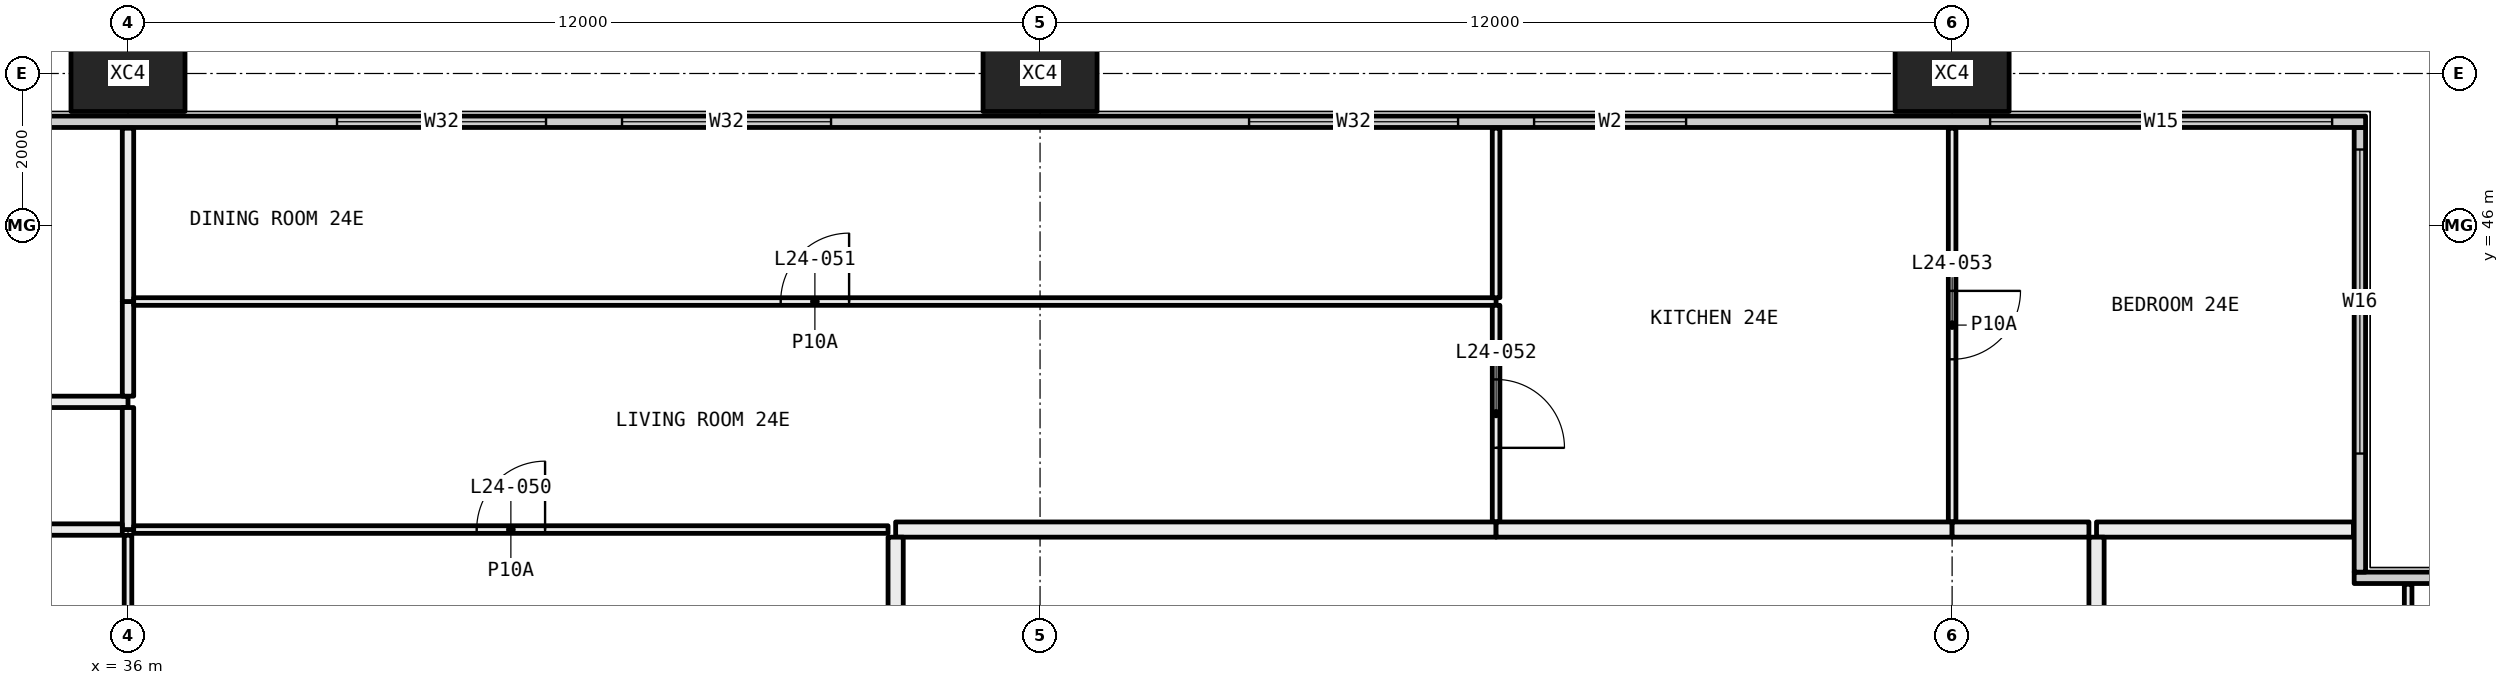
"""IFC4 building model, lengths in metres.
Left out: names, types, materials, properties, quantities, classifications, styles, units other than length and angle.
Written with IfcOpenShell. Run it as: python <this file> out.ifc"""

import sys

from ifc_helpers import new_model, si_unit, direction, frame, frame_2d, origin, origin_2d, place, context, subcontext, project, spatial, rectangle, hollow_rectangle, extrude, element, fill, save


model = new_model("IFC4")
c1 = context("Model", 3, precision=1e-05, world=origin(), true_north=direction((0.0, 1.0)))
c2 = subcontext(c1, "Body", "Model", "MODEL_VIEW")
j1 = project(units=[si_unit("LENGTHUNIT", "METRE"), si_unit("PLANEANGLEUNIT", "RADIAN")], contexts=[c1])
p1 = place(None, origin())
s1 = spatial("IfcSite", under=j1, at=p1, CompositionType="ELEMENT")
p2 = place(p1, origin())
s2 = spatial("IfcBuilding", under=s1, at=p2, CompositionType="ELEMENT")
p3 = place(p2, frame((0.0, 0.0, 96.6)))
s3 = spatial("IfcBuildingStorey", under=s2, at=p3, CompositionType="ELEMENT", Elevation=96.6)
for number, where, z_axis, x_axis in (
    (1, (36.0, 48.0, -0.4), (0.0, 0.0, 1.0), (1.0, 0.0, 0.0)),
    (2, (48.0, 48.0, -0.4), (0.0, 0.0, 1.0), (1.0, 0.0, 0.0)),
    (3, (60.0, 48.0, -0.4), (0.0, 0.0, 1.0), (1.0, 0.0, 0.0)),
):
    element("IfcColumn", number, at=place(p3, frame(where, z_axis=z_axis, x_axis=x_axis)), inside=s3, PredefinedType="COLUMN", context=c2, shape_type="SweptSolid", body=[
        extrude(hollow_rectangle(XDim=1.5, YDim=1.0, WallThickness=0.06, at=origin_2d()), origin(), (0.0, 0.0, 1.0), 3.45),
    ])
p4 = place(p3, frame((65.29, 41.365, 0.0), z_axis=(0.0, 0.0, 1.0), x_axis=(1.0, 0.0, 0.0)))
e4 = element("IfcWall", 4, at=p4, inside=s3, PredefinedType="ELEMENTEDWALL", context=c2, shape_type="SweptSolid", body=[
    extrude(rectangle(XDim=6.15, YDim=0.15, at=frame_2d((3.075, 0.0))), origin(), (0.0, 0.0, 1.0), 3.05),
])
p5 = place(p4, frame((1.71, 0.0, 0.45)))
e5 = element("IfcOpeningElement", 5, at=p5, cuts=e4, PredefinedType="OPENING", context=c2, shape_type="SweptSolid", body=[
    extrude(rectangle(XDim=4.0, YDim=2.55, at=frame_2d((2.0, 1.275))), frame((0.0, 0.085, 0.0), z_axis=(0.0, -1.0, 0.0), x_axis=(1.0, 0.0, 0.0)), (0.0, 0.0, 1.0), 0.17),
])
p6 = place(p3, frame((65.365, 41.44, 0.0), z_axis=(0.0, 0.0, 1.0), x_axis=(0.0, 1.0, 0.0)))
e6 = element("IfcWall", 6, at=p6, inside=s3, PredefinedType="ELEMENTEDWALL", context=c2, shape_type="SweptSolid", body=[
    extrude(rectangle(XDim=5.85, YDim=0.15, at=frame_2d((2.925, 0.0))), origin(), (0.0, 0.0, 1.0), 3.05),
])
p7 = place(p6, frame((1.56, 0.0, 0.45)))
e7 = element("IfcOpeningElement", 7, at=p7, cuts=e6, PredefinedType="OPENING", context=c2, shape_type="SweptSolid", body=[
    extrude(rectangle(XDim=4.0, YDim=2.55, at=frame_2d((2.0, 1.275))), frame((0.0, 0.085, 0.0), z_axis=(0.0, -1.0, 0.0), x_axis=(1.0, 0.0, 0.0)), (0.0, 0.0, 1.0), 0.17),
])
p8 = place(p3, frame((6.56, 47.365, 0.0), z_axis=(0.0, 0.0, 1.0), x_axis=(1.0, 0.0, 0.0)))
e8 = element("IfcWall", 8, at=p8, inside=s3, PredefinedType="ELEMENTEDWALL", context=c2, shape_type="SweptSolid", body=[
    extrude(rectangle(XDim=58.88, YDim=0.15, at=frame_2d((29.44, 0.0))), origin(), (0.0, 0.0, 1.0), 3.05),
])
p9 = place(p8, frame((0.44, 0.0, 0.45)))
e9 = element("IfcOpeningElement", 9, at=p9, cuts=e8, PredefinedType="OPENING", context=c2, shape_type="SweptSolid", body=[
    extrude(rectangle(XDim=4.5, YDim=2.55, at=frame_2d((2.25, 1.275))), frame((0.0, 0.085, 0.0), z_axis=(0.0, -1.0, 0.0), x_axis=(1.0, 0.0, 0.0)), (0.0, 0.0, 1.0), 0.17),
])
p10 = place(p8, frame((8.19, 0.0, 0.45)))
e10 = element("IfcOpeningElement", 10, at=p10, cuts=e8, PredefinedType="OPENING", context=c2, shape_type="SweptSolid", body=[
    extrude(rectangle(XDim=2.75, YDim=2.55, at=frame_2d((1.375, 1.275))), frame((0.0, 0.085, 0.0), z_axis=(0.0, -1.0, 0.0), x_axis=(1.0, 0.0, 0.0)), (0.0, 0.0, 1.0), 0.17),
])
p11 = place(p8, frame((11.94, 0.0, 0.45)))
e11 = element("IfcOpeningElement", 11, at=p11, cuts=e8, PredefinedType="OPENING", context=c2, shape_type="SweptSolid", body=[
    extrude(rectangle(XDim=2.75, YDim=2.55, at=frame_2d((1.375, 1.275))), frame((0.0, 0.085, 0.0), z_axis=(0.0, -1.0, 0.0), x_axis=(1.0, 0.0, 0.0)), (0.0, 0.0, 1.0), 0.17),
])
p12 = place(p8, frame((20.19, 0.0, 0.45)))
e12 = element("IfcOpeningElement", 12, at=p12, cuts=e8, PredefinedType="OPENING", context=c2, shape_type="SweptSolid", body=[
    extrude(rectangle(XDim=2.75, YDim=2.55, at=frame_2d((1.375, 1.275))), frame((0.0, 0.085, 0.0), z_axis=(0.0, -1.0, 0.0), x_axis=(1.0, 0.0, 0.0)), (0.0, 0.0, 1.0), 0.17),
])
p13 = place(p8, frame((23.94, 0.0, 0.45)))
e13 = element("IfcOpeningElement", 13, at=p13, cuts=e8, PredefinedType="OPENING", context=c2, shape_type="SweptSolid", body=[
    extrude(rectangle(XDim=2.0, YDim=2.55, at=frame_2d((1.0, 1.275))), frame((0.0, 0.085, 0.0), z_axis=(0.0, -1.0, 0.0), x_axis=(1.0, 0.0, 0.0)), (0.0, 0.0, 1.0), 0.17),
])
p14 = place(p8, frame((32.19, 0.0, 0.45)))
e14 = element("IfcOpeningElement", 14, at=p14, cuts=e8, PredefinedType="OPENING", context=c2, shape_type="SweptSolid", body=[
    extrude(rectangle(XDim=2.75, YDim=2.55, at=frame_2d((1.375, 1.275))), frame((0.0, 0.085, 0.0), z_axis=(0.0, -1.0, 0.0), x_axis=(1.0, 0.0, 0.0)), (0.0, 0.0, 1.0), 0.17),
])
p15 = place(p8, frame((35.94, 0.0, 0.45)))
e15 = element("IfcOpeningElement", 15, at=p15, cuts=e8, PredefinedType="OPENING", context=c2, shape_type="SweptSolid", body=[
    extrude(rectangle(XDim=2.75, YDim=2.55, at=frame_2d((1.375, 1.275))), frame((0.0, 0.085, 0.0), z_axis=(0.0, -1.0, 0.0), x_axis=(1.0, 0.0, 0.0)), (0.0, 0.0, 1.0), 0.17),
])
p16 = place(p8, frame((44.19, 0.0, 0.45)))
e16 = element("IfcOpeningElement", 16, at=p16, cuts=e8, PredefinedType="OPENING", context=c2, shape_type="SweptSolid", body=[
    extrude(rectangle(XDim=2.75, YDim=2.55, at=frame_2d((1.375, 1.275))), frame((0.0, 0.085, 0.0), z_axis=(0.0, -1.0, 0.0), x_axis=(1.0, 0.0, 0.0)), (0.0, 0.0, 1.0), 0.17),
])
p17 = place(p8, frame((47.94, 0.0, 0.45)))
e17 = element("IfcOpeningElement", 17, at=p17, cuts=e8, PredefinedType="OPENING", context=c2, shape_type="SweptSolid", body=[
    extrude(rectangle(XDim=2.0, YDim=2.55, at=frame_2d((1.0, 1.275))), frame((0.0, 0.085, 0.0), z_axis=(0.0, -1.0, 0.0), x_axis=(1.0, 0.0, 0.0)), (0.0, 0.0, 1.0), 0.17),
])
p18 = place(p8, frame((53.94, 0.0, 0.45)))
e18 = element("IfcOpeningElement", 18, at=p18, cuts=e8, PredefinedType="OPENING", context=c2, shape_type="SweptSolid", body=[
    extrude(rectangle(XDim=4.5, YDim=2.55, at=frame_2d((2.25, 1.275))), frame((0.0, 0.085, 0.0), z_axis=(0.0, -1.0, 0.0), x_axis=(1.0, 0.0, 0.0)), (0.0, 0.0, 1.0), 0.17),
])
p19 = place(p3, frame((66.0, 41.28, 0.0), z_axis=(0.0, 0.0, 1.0), x_axis=(0.0, -1.0, 0.0)))
e19 = element("IfcWall", 19, at=p19, inside=s3, PredefinedType="PARTITIONING", context=c2, shape_type="SweptSolid", body=[
    extrude(rectangle(XDim=3.78, YDim=0.1, at=frame_2d((1.89, 0.0))), origin(), (0.0, 0.0, 1.0), 3.05),
])
p20 = place(p3, frame((65.28, 42.0, 0.0), z_axis=(0.0, 0.0, 1.0), x_axis=(-1.0, 0.0, 0.0)))
e20 = element("IfcWall", 20, at=p20, inside=s3, PredefinedType="PARTITIONING", context=c2, shape_type="SweptSolid", body=[
    extrude(rectangle(XDim=3.38, YDim=0.2, at=frame_2d((1.69, 0.0))), origin(), (0.0, 0.0, 1.0), 3.05),
])
p21 = place(p3, frame((61.9, 41.9, 0.0), z_axis=(0.0, 0.0, 1.0), x_axis=(0.0, -1.0, 0.0)))
e21 = element("IfcWall", 21, at=p21, inside=s3, PredefinedType="PARTITIONING", context=c2, shape_type="SweptSolid", body=[
    extrude(rectangle(XDim=4.4, YDim=0.2, at=frame_2d((2.2, 0.0))), origin(), (0.0, 0.0, 1.0), 3.05),
])
p22 = place(p3, frame((30.075, 43.68, 0.0), z_axis=(0.0, 0.0, 1.0), x_axis=(1.0, 0.0, 0.0)))
e22 = element("IfcWall", 22, at=p22, inside=s3, PredefinedType="PARTITIONING", context=c2, shape_type="SweptSolid", body=[
    extrude(rectangle(XDim=5.925, YDim=0.15, at=frame_2d((2.962, 0.0))), origin(), (0.0, 0.0, 1.0), 2.45),
])
p23 = place(p3, frame((36.0, 43.755, 0.0), z_axis=(0.0, 0.0, 1.0), x_axis=(0.0, 1.0, 0.0)))
e23 = element("IfcWall", 23, at=p23, inside=s3, PredefinedType="PARTITIONING", context=c2, shape_type="SweptSolid", body=[
    extrude(rectangle(XDim=1.245, YDim=0.15, at=frame_2d((0.623, 0.0))), origin(), (0.0, 0.0, 1.0), 2.45),
])
p24 = place(p3, frame((36.0, 45.0, 0.0), z_axis=(0.0, 0.0, 1.0), x_axis=(0.0, 1.0, 0.0)))
e24 = element("IfcWall", 24, at=p24, inside=s3, PredefinedType="PARTITIONING", context=c2, shape_type="SweptSolid", body=[
    extrude(rectangle(XDim=2.28, YDim=0.15, at=frame_2d((1.14, 0.0))), origin(), (0.0, 0.0, 1.0), 2.45),
])
p25 = place(p3, frame((36.0, 42.0, 0.0), z_axis=(0.0, 0.0, 1.0), x_axis=(0.0, 1.0, 0.0)))
e25 = element("IfcWall", 25, at=p25, inside=s3, PredefinedType="PARTITIONING", context=c2, shape_type="SweptSolid", body=[
    extrude(rectangle(XDim=1.605, YDim=0.15, at=frame_2d((0.802, 0.0))), origin(), (0.0, 0.0, 1.0), 2.45),
])
p26 = place(p3, frame((31.5, 42.0, 0.0), z_axis=(0.0, 0.0, 1.0), x_axis=(1.0, 0.0, 0.0)))
e26 = element("IfcWall", 26, at=p26, inside=s3, PredefinedType="PARTITIONING", context=c2, shape_type="SweptSolid", body=[
    extrude(rectangle(XDim=4.425, YDim=0.15, at=frame_2d((2.212, 0.0))), origin(), (0.0, 0.0, 1.0), 2.45),
])
p27 = place(p3, frame((54.0, 45.0, 0.0), z_axis=(0.0, 0.0, 1.0), x_axis=(-1.0, 0.0, 0.0)))
e27 = element("IfcWall", 27, at=p27, inside=s3, PredefinedType="PARTITIONING", context=c2, shape_type="SweptSolid", body=[
    extrude(rectangle(XDim=17.925, YDim=0.1, at=frame_2d((8.962, 0.0))), origin(), (0.0, 0.0, 1.0), 2.45),
])
p28 = place(p27, frame((8.512, 0.0, 0.0)))
e28 = element("IfcOpeningElement", 28, at=p28, cuts=e27, PredefinedType="OPENING", context=c2, shape_type="SweptSolid", body=[
    extrude(rectangle(XDim=0.9, YDim=2.1, at=frame_2d((0.45, 1.05))), frame((0.0, 0.06, 0.0), z_axis=(0.0, -1.0, 0.0), x_axis=(1.0, 0.0, 0.0)), (0.0, 0.0, 1.0), 0.12),
])
p29 = place(p3, frame((54.0, 42.1, 0.0), z_axis=(0.0, 0.0, 1.0), x_axis=(0.0, 1.0, 0.0)))
e29 = element("IfcWall", 29, at=p29, inside=s3, PredefinedType="PARTITIONING", context=c2, shape_type="SweptSolid", body=[
    extrude(rectangle(XDim=2.85, YDim=0.1, at=frame_2d((1.425, 0.0))), origin(), (0.0, 0.0, 1.0), 3.05),
])
p30 = place(p29, frame((0.975, 0.0, 0.0)))
e30 = element("IfcOpeningElement", 30, at=p30, cuts=e29, PredefinedType="OPENING", context=c2, shape_type="SweptSolid", body=[
    extrude(rectangle(XDim=0.9, YDim=2.1, at=frame_2d((0.45, 1.05))), frame((0.0, 0.06, 0.0), z_axis=(0.0, -1.0, 0.0), x_axis=(1.0, 0.0, 0.0)), (0.0, 0.0, 1.0), 0.12),
])
p31 = place(p3, frame((36.075, 42.0, 0.0), z_axis=(0.0, 0.0, 1.0), x_axis=(1.0, 0.0, 0.0)))
e31 = element("IfcWall", 31, at=p31, inside=s3, PredefinedType="PARTITIONING", context=c2, shape_type="SweptSolid", body=[
    extrude(rectangle(XDim=9.925, YDim=0.1, at=frame_2d((4.962, 0.0))), origin(), (0.0, 0.0, 1.0), 2.45),
])
p32 = place(p31, frame((4.512, 0.0, 0.0)))
e32 = element("IfcOpeningElement", 32, at=p32, cuts=e31, PredefinedType="OPENING", context=c2, shape_type="SweptSolid", body=[
    extrude(rectangle(XDim=0.9, YDim=2.1, at=frame_2d((0.45, 1.05))), frame((0.0, 0.06, 0.0), z_axis=(0.0, -1.0, 0.0), x_axis=(1.0, 0.0, 0.0)), (0.0, 0.0, 1.0), 0.12),
])
p33 = place(p3, frame((46.1, 42.0, 0.0), z_axis=(0.0, 0.0, 1.0), x_axis=(1.0, 0.0, 0.0)))
e33 = element("IfcWall", 33, at=p33, inside=s3, PredefinedType="PARTITIONING", context=c2, shape_type="SweptSolid", body=[
    extrude(rectangle(XDim=7.9, YDim=0.2, at=frame_2d((3.95, 0.0))), origin(), (0.0, 0.0, 1.0), 3.05),
])
p34 = place(p3, frame((54.0, 45.05, 0.0), z_axis=(0.0, 0.0, 1.0), x_axis=(0.0, 1.0, 0.0)))
e34 = element("IfcWall", 34, at=p34, inside=s3, PredefinedType="PARTITIONING", context=c2, shape_type="SweptSolid", body=[
    extrude(rectangle(XDim=2.23, YDim=0.1, at=frame_2d((1.115, 0.0))), origin(), (0.0, 0.0, 1.0), 3.05),
])
p35 = place(p3, frame((60.0, 42.1, 0.0), z_axis=(0.0, 0.0, 1.0), x_axis=(0.0, 1.0, 0.0)))
e35 = element("IfcWall", 35, at=p35, inside=s3, PredefinedType="PARTITIONING", context=c2, shape_type="SweptSolid", body=[
    extrude(rectangle(XDim=5.18, YDim=0.1, at=frame_2d((2.59, 0.0))), origin(), (0.0, 0.0, 1.0), 3.05),
])
p36 = place(p35, frame((2.14, 0.0, 0.0)))
e36 = element("IfcOpeningElement", 36, at=p36, cuts=e35, PredefinedType="OPENING", context=c2, shape_type="SweptSolid", body=[
    extrude(rectangle(XDim=0.9, YDim=2.1, at=frame_2d((0.45, 1.05))), frame((0.0, 0.06, 0.0), z_axis=(0.0, -1.0, 0.0), x_axis=(1.0, 0.0, 0.0)), (0.0, 0.0, 1.0), 0.12),
])
p37 = place(p3, frame((54.0, 42.0, 0.0), z_axis=(0.0, 0.0, 1.0), x_axis=(1.0, 0.0, 0.0)))
e37 = element("IfcWall", 37, at=p37, inside=s3, PredefinedType="PARTITIONING", context=c2, shape_type="SweptSolid", body=[
    extrude(rectangle(XDim=6.0, YDim=0.2, at=frame_2d((3.0, 0.0))), origin(), (0.0, 0.0, 1.0), 3.05),
])
p38 = place(p3, frame((60.0, 42.0, 0.0), z_axis=(0.0, 0.0, 1.0), x_axis=(1.0, 0.0, 0.0)))
e38 = element("IfcWall", 38, at=p38, inside=s3, PredefinedType="PARTITIONING", context=c2, shape_type="SweptSolid", body=[
    extrude(rectangle(XDim=1.8, YDim=0.2, at=frame_2d((0.9, 0.0))), origin(), (0.0, 0.0, 1.0), 3.05),
])
p39 = place(p3, frame((36.0, 36.75, 0.0), z_axis=(0.0, 0.0, 1.0), x_axis=(0.0, 1.0, 0.0)))
e39 = element("IfcWall", 39, at=p39, inside=s3, PredefinedType="PARTITIONING", context=c2, shape_type="SweptSolid", body=[
    extrude(rectangle(XDim=5.175, YDim=0.1, at=frame_2d((2.587, 0.0))), origin(), (0.0, 0.0, 1.0), 2.45),
])
p40 = place(p39, frame((2.137, 0.0, 0.0)))
e40 = element("IfcOpeningElement", 40, at=p40, cuts=e39, PredefinedType="OPENING", context=c2, shape_type="SweptSolid", body=[
    extrude(rectangle(XDim=0.9, YDim=2.1, at=frame_2d((0.45, 1.05))), frame((0.0, 0.06, 0.0), z_axis=(0.0, -1.0, 0.0), x_axis=(1.0, 0.0, 0.0)), (0.0, 0.0, 1.0), 0.12),
])
p41 = place(p3, frame((46.1, 36.1, 0.0), z_axis=(0.0, 0.0, 1.0), x_axis=(0.0, 1.0, 0.0)))
e41 = element("IfcWall", 41, at=p41, inside=s3, PredefinedType="PARTITIONING", context=c2, shape_type="SweptSolid", body=[
    extrude(rectangle(XDim=5.8, YDim=0.2, at=frame_2d((2.9, 0.0))), origin(), (0.0, 0.0, 1.0), 3.05),
])
p42 = place(p7, origin())
e42 = element("IfcWindow", 42, at=p42, inside=s3, PartitioningType="SINGLE_PANEL", PredefinedType="WINDOW", context=c2, shape_type="SweptSolid", body=[
    extrude(rectangle(XDim=4.0, YDim=2.55, at=frame_2d((2.0, 1.275))), frame((0.0, 0.03, 0.0), z_axis=(0.0, -1.0, 0.0), x_axis=(1.0, 0.0, 0.0)), (0.0, 0.0, 1.0), 0.06),
])
fill(e7, e42)
p43 = place(p14, origin())
e43 = element("IfcWindow", 43, at=p43, inside=s3, PartitioningType="SINGLE_PANEL", PredefinedType="WINDOW", context=c2, shape_type="SweptSolid", body=[
    extrude(rectangle(XDim=2.75, YDim=2.55, at=frame_2d((1.375, 1.275))), frame((0.0, 0.03, 0.0), z_axis=(0.0, -1.0, 0.0), x_axis=(1.0, 0.0, 0.0)), (0.0, 0.0, 1.0), 0.06),
])
fill(e14, e43)
p44 = place(p15, origin())
e44 = element("IfcWindow", 44, at=p44, inside=s3, PartitioningType="SINGLE_PANEL", PredefinedType="WINDOW", context=c2, shape_type="SweptSolid", body=[
    extrude(rectangle(XDim=2.75, YDim=2.55, at=frame_2d((1.375, 1.275))), frame((0.0, 0.03, 0.0), z_axis=(0.0, -1.0, 0.0), x_axis=(1.0, 0.0, 0.0)), (0.0, 0.0, 1.0), 0.06),
])
fill(e15, e44)
p45 = place(p16, origin())
e45 = element("IfcWindow", 45, at=p45, inside=s3, PartitioningType="SINGLE_PANEL", PredefinedType="WINDOW", context=c2, shape_type="SweptSolid", body=[
    extrude(rectangle(XDim=2.75, YDim=2.55, at=frame_2d((1.375, 1.275))), frame((0.0, 0.03, 0.0), z_axis=(0.0, -1.0, 0.0), x_axis=(1.0, 0.0, 0.0)), (0.0, 0.0, 1.0), 0.06),
])
fill(e16, e45)
p46 = place(p17, origin())
e46 = element("IfcWindow", 46, at=p46, inside=s3, PartitioningType="SINGLE_PANEL", PredefinedType="WINDOW", context=c2, shape_type="SweptSolid", body=[
    extrude(rectangle(XDim=2.0, YDim=2.55, at=frame_2d((1.0, 1.275))), frame((0.0, 0.03, 0.0), z_axis=(0.0, -1.0, 0.0), x_axis=(1.0, 0.0, 0.0)), (0.0, 0.0, 1.0), 0.06),
])
fill(e17, e46)
p47 = place(p18, origin())
e47 = element("IfcWindow", 47, at=p47, inside=s3, PartitioningType="SINGLE_PANEL", PredefinedType="WINDOW", context=c2, shape_type="SweptSolid", body=[
    extrude(rectangle(XDim=4.5, YDim=2.55, at=frame_2d((2.25, 1.275))), frame((0.0, 0.03, 0.0), z_axis=(0.0, -1.0, 0.0), x_axis=(1.0, 0.0, 0.0)), (0.0, 0.0, 1.0), 0.06),
])
fill(e18, e47)
p48 = place(p32, origin())
e48 = element("IfcDoor", 48, at=p48, inside=s3, OperationType="SINGLE_SWING_LEFT", PredefinedType="DOOR", context=c2, shape_type="SweptSolid", body=[
    extrude(rectangle(XDim=0.9, YDim=2.1, at=frame_2d((0.45, 1.05))), frame((0.0, 0.025, 0.0), z_axis=(0.0, -1.0, 0.0), x_axis=(1.0, 0.0, 0.0)), (0.0, 0.0, 1.0), 0.05),
])
fill(e32, e48)
p49 = place(p28, frame((0.9, 0.0, 0.0), x_axis=(-1.0, 0.0, 0.0)))
e49 = element("IfcDoor", 49, at=p49, inside=s3, OperationType="SINGLE_SWING_LEFT", PredefinedType="DOOR", context=c2, shape_type="SweptSolid", body=[
    extrude(rectangle(XDim=0.9, YDim=2.1, at=frame_2d((0.45, 1.05))), frame((0.0, 0.025, 0.0), z_axis=(0.0, -1.0, 0.0), x_axis=(1.0, 0.0, 0.0)), (0.0, 0.0, 1.0), 0.05),
])
fill(e28, e49)
p50 = place(p30, frame((0.9, 0.0, 0.0), x_axis=(-1.0, 0.0, 0.0)))
e50 = element("IfcDoor", 50, at=p50, inside=s3, OperationType="SINGLE_SWING_LEFT", PredefinedType="DOOR", context=c2, shape_type="SweptSolid", body=[
    extrude(rectangle(XDim=0.9, YDim=2.1, at=frame_2d((0.45, 1.05))), frame((0.0, 0.025, 0.0), z_axis=(0.0, -1.0, 0.0), x_axis=(1.0, 0.0, 0.0)), (0.0, 0.0, 1.0), 0.05),
])
fill(e30, e50)
p51 = place(p36, frame((0.9, 0.0, 0.0), x_axis=(-1.0, 0.0, 0.0)))
e51 = element("IfcDoor", 51, at=p51, inside=s3, OperationType="SINGLE_SWING_RIGHT", PredefinedType="DOOR", context=c2, shape_type="SweptSolid", body=[
    extrude(rectangle(XDim=0.9, YDim=2.1, at=frame_2d((0.45, 1.05))), frame((0.0, 0.025, 0.0), z_axis=(0.0, -1.0, 0.0), x_axis=(1.0, 0.0, 0.0)), (0.0, 0.0, 1.0), 0.05),
])
fill(e36, e51)
save(model, sys.argv[1])
